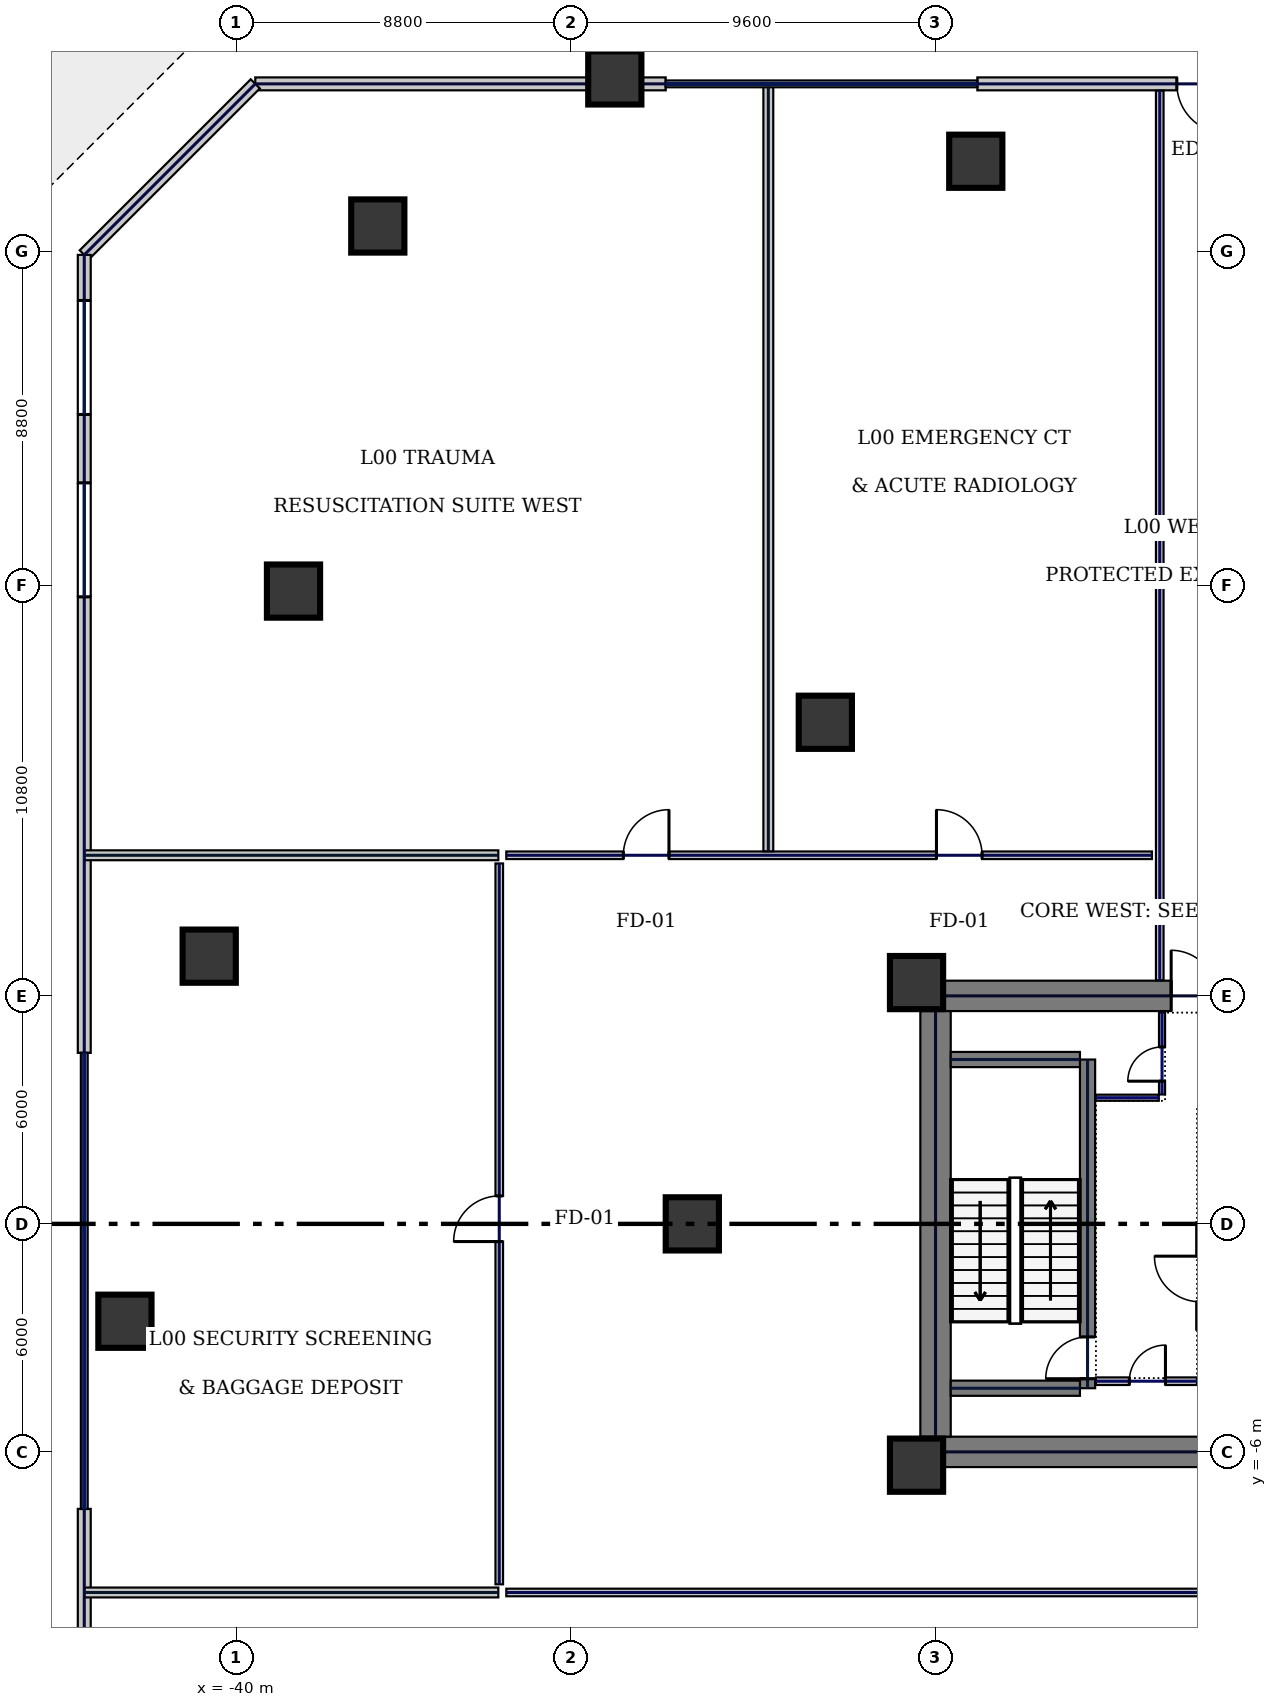
"""IFC4 building model, lengths in metres.
Left out: names, types, materials, properties, quantities, classifications, styles, units other than length and angle.
Written with IfcOpenShell. Run it as: python <this file> out.ifc"""

import sys

from ifc_helpers import new_model, si_unit, direction, frame, frame_2d, origin, origin_2d, place, context, subcontext, project, spatial, rectangle, hollow_circle, extrude, element, fill, save


model = new_model("IFC4")
c1 = context("Model", 3, precision=1e-05, world=origin(), true_north=direction((0.0, 1.0)))
c2 = subcontext(c1, "Body", "Model", "MODEL_VIEW")
j1 = project(units=[si_unit("LENGTHUNIT", "METRE"), si_unit("PLANEANGLEUNIT", "RADIAN")], contexts=[c1])
p1 = place(None, origin())
s1 = spatial("IfcSite", under=j1, at=p1, CompositionType="ELEMENT")
p2 = place(p1, origin())
s2 = spatial("IfcBuilding", under=s1, at=p2, CompositionType="ELEMENT")
p3 = place(p2, origin())
s3 = spatial("IfcBuildingStorey", under=s2, at=p3, CompositionType="ELEMENT", Elevation=0.0)
p4 = place(p3, frame((-22.0, 6.0, 0.0), z_axis=(0.0, 0.0, 1.0), x_axis=(1.0, 0.0, 0.0)))
e1 = element("IfcWall", 1, at=p4, inside=s3, PredefinedType="SHEAR", context=c2, shape_type="SweptSolid", body=[
    extrude(rectangle(XDim=11.6, YDim=0.8, at=frame_2d((5.8, 0.0))), origin(), (0.0, 0.0, 1.0), 8.1),
])
p5 = place(p4, frame((6.6, 0.0, 0.0)))
e2 = element("IfcOpeningElement", 2, at=p5, cuts=e1, PredefinedType="OPENING", context=c2, shape_type="SweptSolid", body=[
    extrude(rectangle(XDim=1.2, YDim=2.2, at=frame_2d((0.6, 1.1))), frame((0.0, 0.41, 0.0), z_axis=(0.0, -1.0, 0.0), x_axis=(1.0, 0.0, 0.0)), (0.0, 0.0, 1.0), 0.82),
])
p6 = place(p3, frame((-22.0, -6.0, 0.0), z_axis=(0.0, 0.0, 1.0), x_axis=(1.0, 0.0, 0.0)))
e3 = element("IfcWall", 3, at=p6, inside=s3, PredefinedType="SHEAR", context=c2, shape_type="SweptSolid", body=[
    extrude(rectangle(XDim=11.6, YDim=0.8, at=frame_2d((5.8, 0.0))), origin(), (0.0, 0.0, 1.0), 8.1),
])
p7 = place(p3, frame((-21.6, -5.6, 0.0), z_axis=(0.0, 0.0, 1.0), x_axis=(0.0, 1.0, 0.0)))
e4 = element("IfcWall", 4, at=p7, inside=s3, PredefinedType="SHEAR", context=c2, shape_type="SweptSolid", body=[
    extrude(rectangle(XDim=11.2, YDim=0.8, at=frame_2d((5.6, 0.0))), origin(), (0.0, 0.0, 1.0), 8.1),
])
p8 = place(p3, frame((-17.6, -4.325, 0.0), z_axis=(0.0, 0.0, 1.0), x_axis=(0.0, 1.0, 0.0)))
e5 = element("IfcWall", 5, at=p8, inside=s3, PredefinedType="SHEAR", context=c2, shape_type="SweptSolid", body=[
    extrude(rectangle(XDim=8.65, YDim=0.4, at=frame_2d((4.325, 0.0))), origin(), (0.0, 0.0, 1.0), 8.1),
])
p9 = place(p8, frame((0.25, 0.0, 0.0)))
e6 = element("IfcOpeningElement", 6, at=p9, cuts=e5, PredefinedType="OPENING", context=c2, shape_type="SweptSolid", body=[
    extrude(rectangle(XDim=1.1, YDim=2.2, at=frame_2d((0.55, 1.1))), frame((0.0, 0.21, 0.0), z_axis=(0.0, -1.0, 0.0), x_axis=(1.0, 0.0, 0.0)), (0.0, 0.0, 1.0), 0.42),
])
for number, where, z_axis, x_axis in (
    (7, (-21.2, -4.325, 0.0), (0.0, 0.0, 1.0), (1.0, 0.0, 0.0)),
    (8, (-21.2, 4.325, 0.0), (0.0, 0.0, 1.0), (1.0, 0.0, 0.0)),
):
    element("IfcWall", number, at=place(p3, frame(where, z_axis=z_axis, x_axis=x_axis)), inside=s3, PredefinedType="SHEAR", context=c2, shape_type="SweptSolid", body=[
        extrude(rectangle(XDim=3.4, YDim=0.4, at=frame_2d((1.7, 0.0))), origin(), (0.0, 0.0, 1.0), 8.1),
    ])
for number, where, z_axis, x_axis in (
    (9, (-22.1, -6.35, 0.0), (0.0, 0.0, 1.0), (1.0, 0.0, 0.0)),
    (10, (-22.1, 6.35, 0.0), (0.0, 0.0, 1.0), (1.0, 0.0, 0.0)),
    (11, (-24.5, 13.2, 0.0), (0.0, 0.0, 1.0), (1.0, 0.0, 0.0)),
    (12, (-28.0, 0.0, 0.0), (0.0, 0.0, 1.0), (1.0, 0.0, 0.0)),
    (13, (-20.541, 27.964, 0.0), (0.0, 0.0, 1.0), (1.0, 0.0, 0.0)),
    (14, (-30.04, 30.156, 0.0), (0.0, 0.0, 1.0), (1.0, 0.0, 0.0)),
    (15, (-36.276, 26.26, 0.0), (0.0, 0.0, 1.0), (1.0, 0.0, 0.0)),
    (16, (-38.494, 16.652, 0.0), (0.0, 0.0, 1.0), (1.0, 0.0, 0.0)),
    (17, (-40.712, 7.045, 0.0), (0.0, 0.0, 1.0), (1.0, 0.0, 0.0)),
    (18, (-42.93, -2.562, 0.0), (0.0, 0.0, 1.0), (1.0, 0.0, 0.0)),
):
    element("IfcColumn", number, at=place(p3, frame(where, z_axis=z_axis, x_axis=x_axis)), inside=s3, PredefinedType="COLUMN", context=c2, shape_type="SweptSolid", body=[
        extrude(hollow_circle(Radius=0.7, WallThickness=0.05, at=origin_2d()), origin(), (0.0, 0.0, 1.0), 8.1),
    ])
p10 = place(p3, frame((-13.0, 30.0, 0.0), z_axis=(0.0, 0.0, 1.0), x_axis=(-1.0, 0.0, 0.0)))
e19 = element("IfcWall", 19, at=p10, inside=s3, PredefinedType="STANDARD", context=c2, shape_type="SweptSolid", body=[
    extrude(rectangle(XDim=7.5, YDim=0.34, at=frame_2d((3.75, 0.0))), origin(), (0.0, 0.0, 1.0), 8.1),
])
p11 = place(p10, frame((0.95, 0.0, 0.0)))
e20 = element("IfcOpeningElement", 20, at=p11, cuts=e19, PredefinedType="OPENING", context=c2, shape_type="SweptSolid", body=[
    extrude(rectangle(XDim=1.3, YDim=2.2, at=frame_2d((0.65, 1.1))), frame((0.0, 0.18, 0.0), z_axis=(0.0, -1.0, 0.0), x_axis=(1.0, 0.0, 0.0)), (0.0, 0.0, 1.0), 0.36),
])
p12 = place(p3, frame((-28.7, 30.0, 0.0), z_axis=(0.0, 0.0, 1.0), x_axis=(-1.0, 0.0, 0.0)))
e21 = element("IfcWall", 21, at=p12, inside=s3, PredefinedType="STANDARD", context=c2, shape_type="SweptSolid", body=[
    extrude(rectangle(XDim=10.8, YDim=0.34, at=frame_2d((5.4, 0.0))), origin(), (0.0, 0.0, 1.0), 7.095),
])
p13 = place(p3, frame((-39.5, 30.0, 0.0), z_axis=(0.0, 0.0, 1.0), x_axis=(-0.707106781187, -0.707106781187, 0.0)))
e22 = element("IfcWall", 22, at=p13, inside=s3, PredefinedType="STANDARD", context=c2, shape_type="SweptSolid", body=[
    extrude(rectangle(XDim=6.364, YDim=0.34, at=frame_2d((3.182, 0.0))), origin(), (0.0, 0.0, 1.0), 8.1),
])
p14 = place(p3, frame((-44.0, 25.5, 0.0), z_axis=(0.0, 0.0, 1.0), x_axis=(0.0, -1.0, 0.0)))
e23 = element("IfcWall", 23, at=p14, inside=s3, PredefinedType="STANDARD", context=c2, shape_type="SweptSolid", body=[
    extrude(rectangle(XDim=21.0, YDim=0.34, at=frame_2d((10.5, 0.0))), origin(), (0.0, 0.0, 1.0), 8.1),
])
p15 = place(p14, frame((1.2, 0.0, 1.2)))
e24 = element("IfcOpeningElement", 24, at=p15, cuts=e23, PredefinedType="OPENING", context=c2, shape_type="SweptSolid", body=[
    extrude(rectangle(XDim=3.0, YDim=1.8, at=frame_2d((1.5, 0.9))), frame((0.0, 0.18, 0.0), z_axis=(0.0, -1.0, 0.0), x_axis=(1.0, 0.0, 0.0)), (0.0, 0.0, 1.0), 0.36),
])
p16 = place(p14, frame((6.0, 0.0, 1.2)))
e25 = element("IfcOpeningElement", 25, at=p16, cuts=e23, PredefinedType="OPENING", context=c2, shape_type="SweptSolid", body=[
    extrude(rectangle(XDim=3.0, YDim=1.8, at=frame_2d((1.5, 0.9))), frame((0.0, 0.18, 0.0), z_axis=(0.0, -1.0, 0.0), x_axis=(1.0, 0.0, 0.0)), (0.0, 0.0, 1.0), 0.36),
])
p17 = place(p3, frame((-44.0, -7.5, 0.0), z_axis=(0.0, 0.0, 1.0), x_axis=(0.0, -1.0, 0.0)))
e26 = element("IfcWall", 26, at=p17, inside=s3, PredefinedType="STANDARD", context=c2, shape_type="SweptSolid", body=[
    extrude(rectangle(XDim=21.0, YDim=0.34, at=frame_2d((10.5, 0.0))), origin(), (0.0, 0.0, 1.0), 7.095),
])
p18 = place(p17, frame((16.0, 0.0, 0.0)))
e27 = element("IfcOpeningElement", 27, at=p18, cuts=e26, PredefinedType="OPENING", context=c2, shape_type="SweptSolid", body=[
    extrude(rectangle(XDim=3.6, YDim=2.6, at=frame_2d((1.8, 1.3))), frame((0.0, 0.18, 0.0), z_axis=(0.0, -1.0, 0.0), x_axis=(1.0, 0.0, 0.0)), (0.0, 0.0, 1.0), 0.36),
])
p19 = place(p3, frame((-15.64, 3.405, 0.0), z_axis=(0.0, 0.0, 1.0), x_axis=(0.0, 1.0, 0.0)))
e28 = element("IfcWall", 28, at=p19, inside=s3, PredefinedType="PARTITIONING", context=c2, shape_type="SweptSolid", body=[
    extrude(rectangle(XDim=2.155, YDim=0.16, at=frame_2d((1.078, 0.0))), origin(), (0.0, 0.0, 1.0), 8.1),
])
p20 = place(p19, frame((0.35, 0.0, 0.0)))
e29 = element("IfcOpeningElement", 29, at=p20, cuts=e28, PredefinedType="OPENING", context=c2, shape_type="SweptSolid", body=[
    extrude(rectangle(XDim=0.9, YDim=2.2, at=frame_2d((0.45, 1.1))), frame((0.0, 0.09, 0.0), z_axis=(0.0, -1.0, 0.0), x_axis=(1.0, 0.0, 0.0)), (0.0, 0.0, 1.0), 0.18),
])
p21 = place(p3, frame((-17.38, 3.32, 0.0), z_axis=(0.0, 0.0, 1.0), x_axis=(1.0, 0.0, 0.0)))
e30 = element("IfcWall", 30, at=p21, inside=s3, PredefinedType="PARTITIONING", context=c2, shape_type="SweptSolid", body=[
    extrude(rectangle(XDim=1.655, YDim=0.16, at=frame_2d((0.827, 0.0))), origin(), (0.0, 0.0, 1.0), 8.1),
])
p22 = place(p3, frame((-17.38, -4.14, 0.0), z_axis=(0.0, 0.0, 1.0), x_axis=(1.0, 0.0, 0.0)))
e31 = element("IfcWall", 31, at=p22, inside=s3, PredefinedType="SOLIDWALL", context=c2, shape_type="SweptSolid", body=[
    extrude(rectangle(XDim=2.66, YDim=0.2, at=frame_2d((1.33, 0.0))), origin(), (0.0, 0.0, 1.0), 8.1),
])
p23 = place(p22, frame((0.88, 0.0, 0.0)))
e32 = element("IfcOpeningElement", 32, at=p23, cuts=e31, PredefinedType="OPENING", context=c2, shape_type="SweptSolid", body=[
    extrude(rectangle(XDim=0.95, YDim=2.2, at=frame_2d((0.475, 1.1))), frame((0.0, 0.11, 0.0), z_axis=(0.0, -1.0, 0.0), x_axis=(1.0, 0.0, 0.0)), (0.0, 0.0, 1.0), 0.22),
])
p24 = place(p3, frame((-14.64, -2.78, 0.0), z_axis=(0.0, 0.0, 1.0), x_axis=(0.0, 1.0, 0.0)))
e33 = element("IfcWall", 33, at=p24, inside=s3, PredefinedType="SOLIDWALL", context=c2, shape_type="SweptSolid", body=[
    extrude(rectangle(XDim=2.82, YDim=0.2, at=frame_2d((1.41, 0.0))), origin(), (0.0, 0.0, 1.0), 8.1),
])
p25 = place(p24, frame((0.73, 0.0, 0.0)))
e34 = element("IfcOpeningElement", 34, at=p25, cuts=e33, PredefinedType="OPENING", context=c2, shape_type="SweptSolid", body=[
    extrude(rectangle(XDim=1.2, YDim=2.2, at=frame_2d((0.6, 1.1))), frame((0.0, 0.11, 0.0), z_axis=(0.0, -1.0, 0.0), x_axis=(1.0, 0.0, 0.0)), (0.0, 0.0, 1.0), 0.22),
])
p26 = place(p3, frame((-15.7, 6.41, 0.0), z_axis=(0.0, 0.0, 1.0), x_axis=(0.0, 1.0, 0.0)))
e35 = element("IfcWall", 35, at=p26, inside=s3, PredefinedType="SOLIDWALL", context=c2, shape_type="SweptSolid", body=[
    extrude(rectangle(XDim=23.41, YDim=0.2, at=frame_2d((11.705, 0.0))), origin(), (0.0, 0.0, 1.0), 8.1),
])
p27 = place(p3, frame((-10.385, -9.7, 0.0), z_axis=(0.0, 0.0, 1.0), x_axis=(-1.0, 0.0, 0.0)))
e36 = element("IfcWall", 36, at=p27, inside=s3, PredefinedType="SOLIDWALL", context=c2, shape_type="SweptSolid", body=[
    extrude(rectangle(XDim=22.51, YDim=0.2, at=frame_2d((11.255, 0.0))), origin(), (0.0, 0.0, 1.0), 8.1),
])
p28 = place(p3, frame((-33.08, -9.485, 0.0), z_axis=(0.0, 0.0, 1.0), x_axis=(0.0, 1.0, 0.0)))
e37 = element("IfcWall", 37, at=p28, inside=s3, PredefinedType="SOLIDWALL", context=c2, shape_type="SweptSolid", body=[
    extrude(rectangle(XDim=18.97, YDim=0.2, at=frame_2d((9.485, 0.0))), origin(), (0.0, 0.0, 1.0), 8.1),
])
p29 = place(p28, frame((9.02, 0.0, 0.0)))
e38 = element("IfcOpeningElement", 38, at=p29, cuts=e37, PredefinedType="OPENING", context=c2, shape_type="SweptSolid", body=[
    extrude(rectangle(XDim=1.2, YDim=2.2, at=frame_2d((0.6, 1.1))), frame((0.0, 0.11, 0.0), z_axis=(0.0, -1.0, 0.0), x_axis=(1.0, 0.0, 0.0)), (0.0, 0.0, 1.0), 0.22),
])
p30 = place(p3, frame((-32.895, 9.7, 0.0), z_axis=(0.0, 0.0, 1.0), x_axis=(1.0, 0.0, 0.0)))
e39 = element("IfcWall", 39, at=p30, inside=s3, PredefinedType="SOLIDWALL", context=c2, shape_type="SweptSolid", body=[
    extrude(rectangle(XDim=16.99, YDim=0.2, at=frame_2d((8.495, 0.0))), origin(), (0.0, 0.0, 1.0), 8.1),
])
p31 = place(p30, frame((3.081, 0.0, 0.0)))
e40 = element("IfcOpeningElement", 40, at=p31, cuts=e39, PredefinedType="OPENING", context=c2, shape_type="SweptSolid", body=[
    extrude(rectangle(XDim=1.2, YDim=2.2, at=frame_2d((0.6, 1.1))), frame((0.0, 0.11, 0.0), z_axis=(0.0, -1.0, 0.0), x_axis=(1.0, 0.0, 0.0)), (0.0, 0.0, 1.0), 0.22),
])
p32 = place(p30, frame((11.319, 0.0, 0.0)))
e41 = element("IfcOpeningElement", 41, at=p32, cuts=e39, PredefinedType="OPENING", context=c2, shape_type="SweptSolid", body=[
    extrude(rectangle(XDim=1.2, YDim=2.2, at=frame_2d((0.6, 1.1))), frame((0.0, 0.11, 0.0), z_axis=(0.0, -1.0, 0.0), x_axis=(1.0, 0.0, 0.0)), (0.0, 0.0, 1.0), 0.22),
])
for number, where, z_axis, x_axis in (
    (42, (-44.0, -9.7, 0.0), (0.0, 0.0, 1.0), (1.0, 0.0, 0.0)),
    (43, (-44.0, 9.7, 0.0), (0.0, 0.0, 1.0), (1.0, 0.0, 0.0)),
):
    element("IfcWall", number, at=place(p3, frame(where, z_axis=z_axis, x_axis=x_axis)), inside=s3, PredefinedType="SOLIDWALL", context=c2, shape_type="SweptSolid", body=[
        extrude(rectangle(XDim=10.895, YDim=0.26, at=frame_2d((5.448, 0.0))), origin(), (0.0, 0.0, 1.0), 8.1),
    ])
p33 = place(p3, frame((-26.0, 9.805, 0.0), z_axis=(0.0, 0.0, 1.0), x_axis=(0.0, 1.0, 0.0)))
e44 = element("IfcWall", 44, at=p33, inside=s3, PredefinedType="SOLIDWALL", context=c2, shape_type="SweptSolid", body=[
    extrude(rectangle(XDim=20.195, YDim=0.26, at=frame_2d((10.098, 0.0))), origin(), (0.0, 0.0, 1.0), 8.1),
])
p34 = place(p11, origin())
e45 = element("IfcDoor", 45, at=p34, inside=s3, OperationType="SINGLE_SWING_LEFT", PredefinedType="DOOR", context=c2, shape_type="SweptSolid", body=[
    extrude(rectangle(XDim=1.3, YDim=2.2, at=frame_2d((0.65, 1.1))), frame((0.0, 0.025, 0.0), z_axis=(0.0, -1.0, 0.0), x_axis=(1.0, 0.0, 0.0)), (0.0, 0.0, 1.0), 0.05),
])
fill(e20, e45)
p35 = place(p15, origin())
e46 = element("IfcWindow", 46, at=p35, inside=s3, PartitioningType="SINGLE_PANEL", PredefinedType="WINDOW", context=c2, shape_type="SweptSolid", body=[
    extrude(rectangle(XDim=3.0, YDim=1.8, at=frame_2d((1.5, 0.9))), frame((0.0, 0.03, 0.0), z_axis=(0.0, -1.0, 0.0), x_axis=(1.0, 0.0, 0.0)), (0.0, 0.0, 1.0), 0.06),
])
fill(e24, e46)
p36 = place(p16, origin())
e47 = element("IfcWindow", 47, at=p36, inside=s3, PartitioningType="SINGLE_PANEL", PredefinedType="WINDOW", context=c2, shape_type="SweptSolid", body=[
    extrude(rectangle(XDim=3.0, YDim=1.8, at=frame_2d((1.5, 0.9))), frame((0.0, 0.03, 0.0), z_axis=(0.0, -1.0, 0.0), x_axis=(1.0, 0.0, 0.0)), (0.0, 0.0, 1.0), 0.06),
])
fill(e25, e47)
p37 = place(p5, origin())
e48 = element("IfcDoor", 48, at=p37, inside=s3, OperationType="SINGLE_SWING_LEFT", PredefinedType="DOOR", context=c2, shape_type="SweptSolid", body=[
    extrude(rectangle(XDim=1.2, YDim=2.2, at=frame_2d((0.6, 1.1))), frame((0.0, 0.025, 0.0), z_axis=(0.0, -1.0, 0.0), x_axis=(1.0, 0.0, 0.0)), (0.0, 0.0, 1.0), 0.05),
])
fill(e2, e48)
p38 = place(p9, origin())
e49 = element("IfcDoor", 49, at=p38, inside=s3, OperationType="SINGLE_SWING_LEFT", PredefinedType="DOOR", context=c2, shape_type="SweptSolid", body=[
    extrude(rectangle(XDim=1.1, YDim=2.2, at=frame_2d((0.55, 1.1))), frame((0.0, 0.025, 0.0), z_axis=(0.0, -1.0, 0.0), x_axis=(1.0, 0.0, 0.0)), (0.0, 0.0, 1.0), 0.05),
])
fill(e6, e49)
p39 = place(p20, origin())
e50 = element("IfcDoor", 50, at=p39, inside=s3, OperationType="SINGLE_SWING_LEFT", PredefinedType="DOOR", context=c2, shape_type="SweptSolid", body=[
    extrude(rectangle(XDim=0.9, YDim=2.2, at=frame_2d((0.45, 1.1))), frame((0.0, 0.025, 0.0), z_axis=(0.0, -1.0, 0.0), x_axis=(1.0, 0.0, 0.0)), (0.0, 0.0, 1.0), 0.05),
])
fill(e29, e50)
p40 = place(p23, origin())
e51 = element("IfcDoor", 51, at=p40, inside=s3, OperationType="SINGLE_SWING_RIGHT", PredefinedType="DOOR", context=c2, shape_type="SweptSolid", body=[
    extrude(rectangle(XDim=0.95, YDim=2.2, at=frame_2d((0.475, 1.1))), frame((0.0, 0.025, 0.0), z_axis=(0.0, -1.0, 0.0), x_axis=(1.0, 0.0, 0.0)), (0.0, 0.0, 1.0), 0.05),
])
fill(e32, e51)
p41 = place(p31, origin())
e52 = element("IfcDoor", 52, at=p41, inside=s3, OperationType="SINGLE_SWING_RIGHT", PredefinedType="DOOR", context=c2, shape_type="SweptSolid", body=[
    extrude(rectangle(XDim=1.2, YDim=2.2, at=frame_2d((0.6, 1.1))), frame((0.0, 0.025, 0.0), z_axis=(0.0, -1.0, 0.0), x_axis=(1.0, 0.0, 0.0)), (0.0, 0.0, 1.0), 0.05),
])
fill(e40, e52)
p42 = place(p32, origin())
e53 = element("IfcDoor", 53, at=p42, inside=s3, OperationType="SINGLE_SWING_LEFT", PredefinedType="DOOR", context=c2, shape_type="SweptSolid", body=[
    extrude(rectangle(XDim=1.2, YDim=2.2, at=frame_2d((0.6, 1.1))), frame((0.0, 0.025, 0.0), z_axis=(0.0, -1.0, 0.0), x_axis=(1.0, 0.0, 0.0)), (0.0, 0.0, 1.0), 0.05),
])
fill(e41, e53)
p43 = place(p29, origin())
e54 = element("IfcDoor", 54, at=p43, inside=s3, OperationType="SINGLE_SWING_LEFT", PredefinedType="DOOR", context=c2, shape_type="SweptSolid", body=[
    extrude(rectangle(XDim=1.2, YDim=2.2, at=frame_2d((0.6, 1.1))), frame((0.0, 0.025, 0.0), z_axis=(0.0, -1.0, 0.0), x_axis=(1.0, 0.0, 0.0)), (0.0, 0.0, 1.0), 0.05),
])
fill(e38, e54)
save(model, sys.argv[1])
